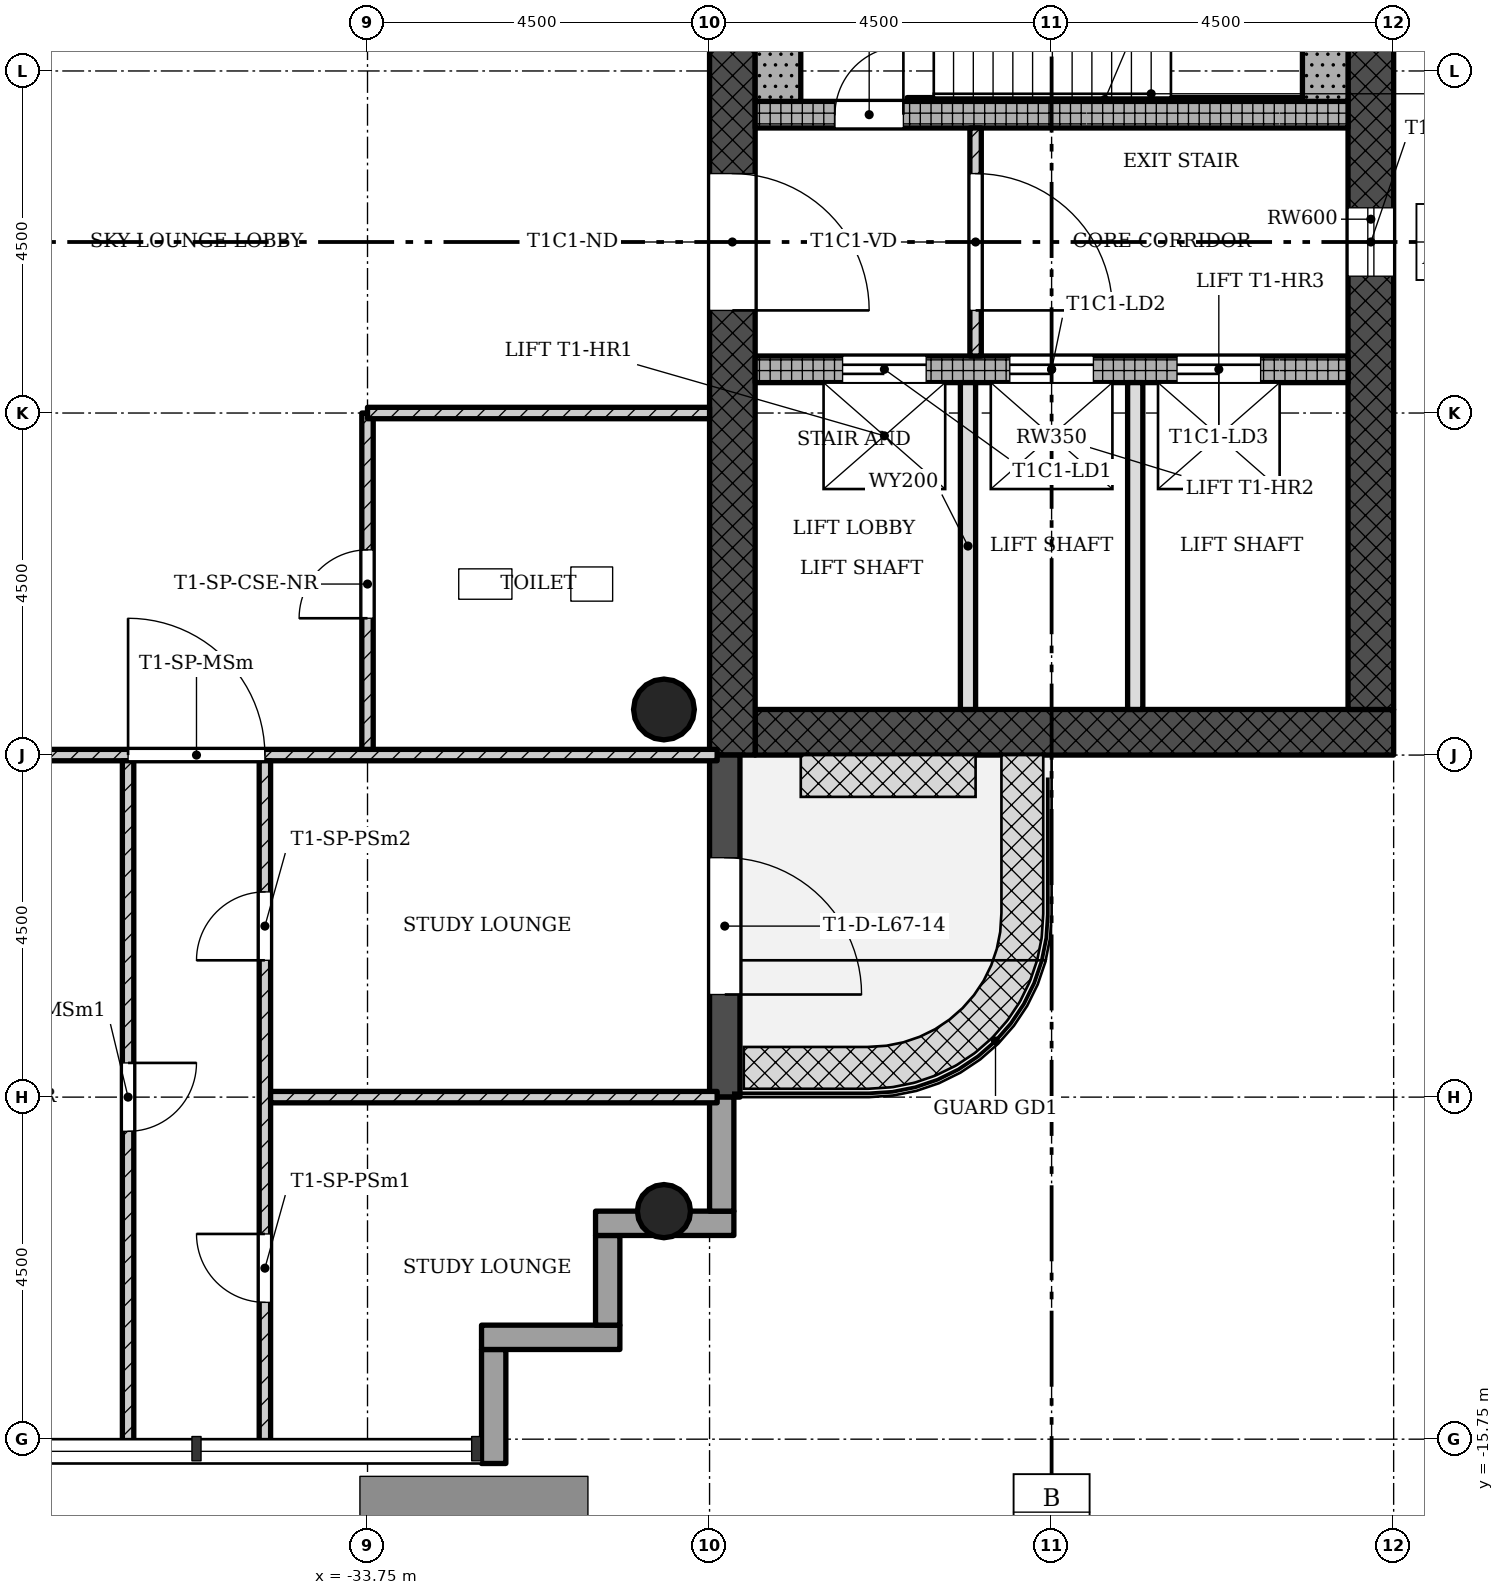
"""IFC4 building model, lengths in metres.
Left out: names, types, materials, properties, quantities, classifications, styles, units other than length and angle.
Written with IfcOpenShell. Run it as: python <this file> out.ifc"""

import sys

from ifc_helpers import new_model, si_unit, direction, frame, frame_2d, origin, origin_2d, place, context, subcontext, project, spatial, rectangle, hollow_circle, extrude, element, fill, save


model = new_model("IFC4")
c1 = context("Model", 3, precision=1e-05, world=origin(), true_north=direction((0.0, 1.0)))
c2 = subcontext(c1, "Body", "Model", "MODEL_VIEW")
j1 = project(units=[si_unit("LENGTHUNIT", "METRE"), si_unit("PLANEANGLEUNIT", "RADIAN")], contexts=[c1])
p1 = place(None, origin())
s1 = spatial("IfcSite", under=j1, at=p1, CompositionType="ELEMENT")
p2 = place(p1, origin())
s2 = spatial("IfcBuilding", under=s1, at=p2, CompositionType="ELEMENT")
p3 = place(p2, frame((0.0, 0.0, 242.4)))
s3 = spatial("IfcBuildingStorey", under=s2, at=p3, CompositionType="ELEMENT", Elevation=242.4)
p4 = place(p3, frame((-28.65, -6.45, 0.0), z_axis=(0.0, 0.0, 1.0), x_axis=(1.0, 0.0, 0.0)))
e1 = element("IfcWall", 1, at=p4, inside=s3, PredefinedType="SHEAR", context=c2, shape_type="SweptSolid", body=[
    extrude(rectangle(XDim=8.4, YDim=0.6, at=frame_2d((4.2, 0.0))), origin(), (0.0, 0.0, 1.0), 4.5),
])
p5 = place(p3, frame((-20.55, -6.15, 0.0), z_axis=(0.0, 0.0, 1.0), x_axis=(0.0, 1.0, 0.0)))
e2 = element("IfcWall", 2, at=p5, inside=s3, PredefinedType="SHEAR", context=c2, shape_type="SweptSolid", body=[
    extrude(rectangle(XDim=12.9, YDim=0.6, at=frame_2d((6.45, 0.0))), origin(), (0.0, 0.0, 1.0), 4.5),
])
p6 = place(p5, frame((5.7, 0.0, 0.45)))
e3 = element("IfcOpeningElement", 3, at=p6, cuts=e2, PredefinedType="OPENING", context=c2, shape_type="SweptSolid", body=[
    extrude(rectangle(XDim=0.9, YDim=2.4, at=frame_2d((0.45, 1.2))), frame((0.0, 0.31, 0.0), z_axis=(0.0, -1.0, 0.0), x_axis=(1.0, 0.0, 0.0)), (0.0, 0.0, 1.0), 0.62),
])
p7 = place(p3, frame((-28.95, 6.15, 0.0), z_axis=(0.0, 0.0, 1.0), x_axis=(0.0, -1.0, 0.0)))
e4 = element("IfcWall", 4, at=p7, inside=s3, PredefinedType="SHEAR", context=c2, shape_type="SweptSolid", body=[
    extrude(rectangle(XDim=12.9, YDim=0.6, at=frame_2d((6.45, 0.0))), origin(), (0.0, 0.0, 1.0), 4.5),
])
p8 = place(p7, frame((5.25, 0.0, 0.0)))
e5 = element("IfcOpeningElement", 5, at=p8, cuts=e4, PredefinedType="OPENING", context=c2, shape_type="SweptSolid", body=[
    extrude(rectangle(XDim=1.8, YDim=2.1, at=frame_2d((0.9, 1.05))), frame((0.0, 0.31, 0.0), z_axis=(0.0, -1.0, 0.0), x_axis=(1.0, 0.0, 0.0)), (0.0, 0.0, 1.0), 0.62),
])
p9 = place(p3, frame((-28.65, -1.675, 0.0), z_axis=(0.0, 0.0, 1.0), x_axis=(1.0, 0.0, 0.0)))
e6 = element("IfcWall", 6, at=p9, inside=s3, PredefinedType="SHEAR", context=c2, shape_type="SweptSolid", body=[
    extrude(rectangle(XDim=7.8, YDim=0.35, at=frame_2d((3.9, 0.0))), origin(), (0.0, 0.0, 1.0), 4.5),
])
p10 = place(p9, frame((1.15, 0.0, 0.0)))
e7 = element("IfcOpeningElement", 7, at=p10, cuts=e6, PredefinedType="OPENING", context=c2, shape_type="SweptSolid", body=[
    extrude(rectangle(XDim=1.1, YDim=2.1, at=frame_2d((0.55, 1.05))), frame((0.0, 0.185, 0.0), z_axis=(0.0, -1.0, 0.0), x_axis=(1.0, 0.0, 0.0)), (0.0, 0.0, 1.0), 0.37),
])
p11 = place(p9, frame((3.35, 0.0, 0.0)))
e8 = element("IfcOpeningElement", 8, at=p11, cuts=e6, PredefinedType="OPENING", context=c2, shape_type="SweptSolid", body=[
    extrude(rectangle(XDim=1.1, YDim=2.1, at=frame_2d((0.55, 1.05))), frame((0.0, 0.185, 0.0), z_axis=(0.0, -1.0, 0.0), x_axis=(1.0, 0.0, 0.0)), (0.0, 0.0, 1.0), 0.37),
])
p12 = place(p9, frame((5.55, 0.0, 0.0)))
e9 = element("IfcOpeningElement", 9, at=p12, cuts=e6, PredefinedType="OPENING", context=c2, shape_type="SweptSolid", body=[
    extrude(rectangle(XDim=1.1, YDim=2.1, at=frame_2d((0.55, 1.05))), frame((0.0, 0.185, 0.0), z_axis=(0.0, -1.0, 0.0), x_axis=(1.0, 0.0, 0.0)), (0.0, 0.0, 1.0), 0.37),
])
p13 = place(p3, frame((-28.65, 1.675, 0.0), z_axis=(0.0, 0.0, 1.0), x_axis=(1.0, 0.0, 0.0)))
e10 = element("IfcWall", 10, at=p13, inside=s3, PredefinedType="SHEAR", context=c2, shape_type="SweptSolid", body=[
    extrude(rectangle(XDim=7.8, YDim=0.35, at=frame_2d((3.9, 0.0))), origin(), (0.0, 0.0, 1.0), 4.5),
])
p14 = place(p13, frame((1.05, 0.0, 0.0)))
e11 = element("IfcOpeningElement", 11, at=p14, cuts=e10, PredefinedType="OPENING", context=c2, shape_type="SweptSolid", body=[
    extrude(rectangle(XDim=0.9, YDim=2.1, at=frame_2d((0.45, 1.05))), frame((0.0, 0.185, 0.0), z_axis=(0.0, -1.0, 0.0), x_axis=(1.0, 0.0, 0.0)), (0.0, 0.0, 1.0), 0.37),
])
p15 = place(p3, frame((-29.85, -12.75, 0.0), z_axis=(0.0, 0.0, 1.0), x_axis=(1.0, 0.0, 0.0)))
e12 = element("IfcColumn", 12, at=p15, inside=s3, PredefinedType="COLUMN", context=c2, shape_type="SweptSolid", body=[
    extrude(hollow_circle(Radius=0.35, WallThickness=0.025, at=origin_2d()), origin(), (0.0, 0.0, 1.0), 4.5),
])
p16 = place(p3, frame((-29.85, -6.15, 0.0), z_axis=(0.0, 0.0, 1.0), x_axis=(1.0, 0.0, 0.0)))
e13 = element("IfcColumn", 13, at=p16, inside=s3, PredefinedType="COLUMN", context=c2, shape_type="SweptSolid", body=[
    extrude(hollow_circle(Radius=0.4, WallThickness=0.028, at=origin_2d()), origin(), (0.0, 0.0, 1.0), 4.5),
])
p17 = place(p3, frame((-32.09, -16.07, -0.3), z_axis=(0.0, 0.0, 1.0), x_axis=(0.0, 1.0, 0.0)))
e14 = element("IfcWall", 14, at=p17, inside=s3, PredefinedType="STANDARD", context=c2, shape_type="SweptSolid", body=[
    extrude(rectangle(XDim=1.5, YDim=0.32, at=frame_2d((0.75, 0.0))), origin(), (0.0, 0.0, 1.0), 4.5),
])
p18 = place(p3, frame((-32.25, -14.41, -0.3), z_axis=(0.0, 0.0, 1.0), x_axis=(1.0, 0.0, 0.0)))
e15 = element("IfcWall", 15, at=p18, inside=s3, PredefinedType="STANDARD", context=c2, shape_type="SweptSolid", body=[
    extrude(rectangle(XDim=1.82, YDim=0.32, at=frame_2d((0.91, 0.0))), origin(), (0.0, 0.0, 1.0), 4.5),
])
p19 = place(p3, frame((-30.59, -14.25, -0.3), z_axis=(0.0, 0.0, 1.0), x_axis=(0.0, 1.0, 0.0)))
e16 = element("IfcWall", 16, at=p19, inside=s3, PredefinedType="STANDARD", context=c2, shape_type="SweptSolid", body=[
    extrude(rectangle(XDim=1.18, YDim=0.32, at=frame_2d((0.59, 0.0))), origin(), (0.0, 0.0, 1.0), 4.5),
])
p20 = place(p3, frame((-30.75, -12.91, -0.3), z_axis=(0.0, 0.0, 1.0), x_axis=(1.0, 0.0, 0.0)))
e17 = element("IfcWall", 17, at=p20, inside=s3, PredefinedType="STANDARD", context=c2, shape_type="SweptSolid", body=[
    extrude(rectangle(XDim=1.82, YDim=0.32, at=frame_2d((0.91, 0.0))), origin(), (0.0, 0.0, 1.0), 4.5),
])
p21 = place(p3, frame((-29.09, -12.75, -0.3), z_axis=(0.0, 0.0, 1.0), x_axis=(0.0, 1.0, 0.0)))
e18 = element("IfcWall", 18, at=p21, inside=s3, PredefinedType="STANDARD", context=c2, shape_type="SweptSolid", body=[
    extrude(rectangle(XDim=1.5, YDim=0.32, at=frame_2d((0.75, 0.0))), origin(), (0.0, 0.0, 1.0), 4.5),
])
p22 = place(p3, frame((-29.05, -11.25, -0.02), z_axis=(0.0, 0.0, 1.0), x_axis=(0.0, 1.0, 0.0)))
e19 = element("IfcWall", 19, at=p22, inside=s3, PredefinedType="STANDARD", context=c2, shape_type="SweptSolid", body=[
    extrude(rectangle(XDim=4.5, YDim=0.4, at=frame_2d((2.25, 0.0))), origin(), (0.0, 0.0, 1.0), 4.22),
])
p23 = place(p22, frame((1.35, 0.0, 0.02)))
e20 = element("IfcOpeningElement", 20, at=p23, cuts=e19, PredefinedType="OPENING", context=c2, shape_type="SweptSolid", body=[
    extrude(rectangle(XDim=1.8, YDim=2.1, at=frame_2d((0.9, 1.05))), frame((0.0, 0.21, 0.0), z_axis=(0.0, -1.0, 0.0), x_axis=(1.0, 0.0, 0.0)), (0.0, 0.0, 1.0), 0.42),
])
p24 = place(p3, frame((-25.75, -1.5, 0.0), z_axis=(0.0, 0.0, 1.0), x_axis=(0.0, 1.0, 0.0)))
e21 = element("IfcWall", 21, at=p24, inside=s3, PredefinedType="PARTITIONING", context=c2, shape_type="SweptSolid", body=[
    extrude(rectangle(XDim=3.0, YDim=0.15, at=frame_2d((1.5, 0.0))), origin(), (0.0, 0.0, 1.0), 4.08),
])
p25 = place(p24, frame((0.6, 0.0, 0.0)))
e22 = element("IfcOpeningElement", 22, at=p25, cuts=e21, PredefinedType="OPENING", context=c2, shape_type="SweptSolid", body=[
    extrude(rectangle(XDim=1.8, YDim=2.1, at=frame_2d((0.9, 1.05))), frame((0.0, 0.085, 0.0), z_axis=(0.0, -1.0, 0.0), x_axis=(1.0, 0.0, 0.0)), (0.0, 0.0, 1.0), 0.17),
])
for number, where, z_axis, x_axis in (
    (23, (-25.85, -6.15, 0.0), (0.0, 0.0, 1.0), (0.0, 1.0, 0.0)),
    (24, (-23.65, -6.15, 0.0), (0.0, 0.0, 1.0), (0.0, 1.0, 0.0)),
):
    element("IfcWall", number, at=place(p3, frame(where, z_axis=z_axis, x_axis=x_axis)), inside=s3, PredefinedType="SOLIDWALL", context=c2, shape_type="SweptSolid", body=[
        extrude(rectangle(XDim=4.3, YDim=0.2, at=frame_2d((2.15, 0.0))), origin(), (0.0, 0.0, 1.0), 4.08),
    ])
p26 = place(p3, frame((-33.75, -6.75, 0.0), z_axis=(0.0, 0.0, 1.0), x_axis=(0.0, 1.0, 0.0)))
e25 = element("IfcWall", 25, at=p26, inside=s3, PredefinedType="PARTITIONING", context=c2, shape_type="SweptSolid", body=[
    extrude(rectangle(XDim=4.5, YDim=0.15, at=frame_2d((2.25, 0.0))), origin(), (0.0, 0.0, 1.0), 4.08),
])
p27 = place(p26, frame((1.8, 0.0, 0.0)))
e26 = element("IfcOpeningElement", 26, at=p27, cuts=e25, PredefinedType="OPENING", context=c2, shape_type="SweptSolid", body=[
    extrude(rectangle(XDim=0.9, YDim=2.1, at=frame_2d((0.45, 1.05))), frame((0.0, 0.085, 0.0), z_axis=(0.0, -1.0, 0.0), x_axis=(1.0, 0.0, 0.0)), (0.0, 0.0, 1.0), 0.17),
])
p28 = place(p3, frame((-33.75, -2.25, 0.0), z_axis=(0.0, 0.0, 1.0), x_axis=(1.0, 0.0, 0.0)))
e27 = element("IfcWall", 27, at=p28, inside=s3, PredefinedType="PARTITIONING", context=c2, shape_type="SweptSolid", body=[
    extrude(rectangle(XDim=4.5, YDim=0.15, at=frame_2d((2.25, 0.0))), origin(), (0.0, 0.0, 1.0), 4.08),
])
p29 = place(p3, frame((-42.85, -6.75, 0.0), z_axis=(0.0, 0.0, 1.0), x_axis=(1.0, 0.0, 0.0)))
e28 = element("IfcWall", 28, at=p29, inside=s3, PredefinedType="PARTITIONING", context=c2, shape_type="SweptSolid", body=[
    extrude(rectangle(XDim=13.7, YDim=0.15, at=frame_2d((6.85, 0.0))), origin(), (0.0, 0.0, 1.0), 4.08),
])
p30 = place(p29, frame((5.95, 0.0, 0.0)))
e29 = element("IfcOpeningElement", 29, at=p30, cuts=e28, PredefinedType="OPENING", context=c2, shape_type="SweptSolid", body=[
    extrude(rectangle(XDim=1.8, YDim=2.1, at=frame_2d((0.9, 1.05))), frame((0.0, 0.085, 0.0), z_axis=(0.0, -1.0, 0.0), x_axis=(1.0, 0.0, 0.0)), (0.0, 0.0, 1.0), 0.17),
])
p31 = place(p3, frame((-35.1, -15.85, 0.0), z_axis=(0.0, 0.0, 1.0), x_axis=(0.0, 1.0, 0.0)))
e30 = element("IfcWall", 30, at=p31, inside=s3, PredefinedType="PARTITIONING", context=c2, shape_type="SweptSolid", body=[
    extrude(rectangle(XDim=9.025, YDim=0.15, at=frame_2d((4.513, 0.0))), origin(), (0.0, 0.0, 1.0), 4.08),
])
p32 = place(p31, frame((1.9, 0.0, 0.0)))
e31 = element("IfcOpeningElement", 31, at=p32, cuts=e30, PredefinedType="OPENING", context=c2, shape_type="SweptSolid", body=[
    extrude(rectangle(XDim=0.9, YDim=2.1, at=frame_2d((0.45, 1.05))), frame((0.0, 0.085, 0.0), z_axis=(0.0, -1.0, 0.0), x_axis=(1.0, 0.0, 0.0)), (0.0, 0.0, 1.0), 0.17),
])
p33 = place(p31, frame((6.4, 0.0, 0.0)))
e32 = element("IfcOpeningElement", 32, at=p33, cuts=e30, PredefinedType="OPENING", context=c2, shape_type="SweptSolid", body=[
    extrude(rectangle(XDim=0.9, YDim=2.1, at=frame_2d((0.45, 1.05))), frame((0.0, 0.085, 0.0), z_axis=(0.0, -1.0, 0.0), x_axis=(1.0, 0.0, 0.0)), (0.0, 0.0, 1.0), 0.17),
])
p34 = place(p3, frame((-35.025, -11.25, 0.0), z_axis=(0.0, 0.0, 1.0), x_axis=(1.0, 0.0, 0.0)))
e33 = element("IfcWall", 33, at=p34, inside=s3, PredefinedType="PARTITIONING", context=c2, shape_type="SweptSolid", body=[
    extrude(rectangle(XDim=5.875, YDim=0.15, at=frame_2d((2.938, 0.0))), origin(), (0.0, 0.0, 1.0), 4.08),
])
p35 = place(p3, frame((-36.9, -15.85, 0.0), z_axis=(0.0, 0.0, 1.0), x_axis=(0.0, 1.0, 0.0)))
e34 = element("IfcWall", 34, at=p35, inside=s3, PredefinedType="PARTITIONING", context=c2, shape_type="SweptSolid", body=[
    extrude(rectangle(XDim=9.025, YDim=0.15, at=frame_2d((4.513, 0.0))), origin(), (0.0, 0.0, 1.0), 4.08),
])
p36 = place(p35, frame((4.15, 0.0, 0.0)))
e35 = element("IfcOpeningElement", 35, at=p36, cuts=e34, PredefinedType="OPENING", context=c2, shape_type="SweptSolid", body=[
    extrude(rectangle(XDim=0.9, YDim=2.1, at=frame_2d((0.45, 1.05))), frame((0.0, 0.085, 0.0), z_axis=(0.0, -1.0, 0.0), x_axis=(1.0, 0.0, 0.0)), (0.0, 0.0, 1.0), 0.17),
])
for number, where, z_axis, x_axis in (
    (36, (-21.15, 1.85, 0.0), (0.0, 0.0, 1.0), (0.0, 1.0, 0.0)),
    (37, (-28.35, 1.85, 0.0), (0.0, 0.0, 1.0), (0.0, 1.0, 0.0)),
):
    element("IfcWall", number, at=place(p3, frame(where, z_axis=z_axis, x_axis=x_axis)), inside=s3, PredefinedType="SHEAR", context=c2, shape_type="SweptSolid", body=[
        extrude(rectangle(XDim=4.3, YDim=0.6, at=frame_2d((2.15, 0.0))), origin(), (0.0, 0.0, 1.0), 4.5),
    ])
p37 = place(p3, frame((-26.65, 1.875, 0.0), z_axis=(0.0, 0.0, 1.0), x_axis=(1.0, 0.0, 0.0)))
e38 = element("IfcWall", 38, at=p37, inside=s3, PredefinedType="SHEAR", context=c2, shape_type="SweptSolid", body=[
    extrude(rectangle(XDim=5.2, YDim=0.05, at=frame_2d((2.6, 0.0))), origin(), (0.0, 0.0, 1.0), 4.5),
])
p38 = place(p23, origin())
e39 = element("IfcDoor", 39, at=p38, inside=s3, OperationType="SINGLE_SWING_LEFT", PredefinedType="DOOR", context=c2, shape_type="SweptSolid", body=[
    extrude(rectangle(XDim=1.8, YDim=2.1, at=frame_2d((0.9, 1.05))), frame((0.0, 0.025, 0.0), z_axis=(0.0, -1.0, 0.0), x_axis=(1.0, 0.0, 0.0)), (0.0, 0.0, 1.0), 0.05),
])
fill(e20, e39)
p39 = place(p6, origin())
e40 = element("IfcWindow", 40, at=p39, inside=s3, PartitioningType="SINGLE_PANEL", PredefinedType="WINDOW", context=c2, shape_type="SweptSolid", body=[
    extrude(rectangle(XDim=0.9, YDim=2.4, at=frame_2d((0.45, 1.2))), frame((0.0, 0.03, 0.0), z_axis=(0.0, -1.0, 0.0), x_axis=(1.0, 0.0, 0.0)), (0.0, 0.0, 1.0), 0.06),
])
fill(e3, e40)
p40 = place(p25, origin())
e41 = element("IfcDoor", 41, at=p40, inside=s3, OperationType="SINGLE_SWING_LEFT", PredefinedType="DOOR", context=c2, shape_type="SweptSolid", body=[
    extrude(rectangle(XDim=1.8, YDim=2.1, at=frame_2d((0.9, 1.05))), frame((0.0, 0.025, 0.0), z_axis=(0.0, -1.0, 0.0), x_axis=(1.0, 0.0, 0.0)), (0.0, 0.0, 1.0), 0.05),
])
fill(e22, e41)
p41 = place(p27, origin())
e42 = element("IfcDoor", 42, at=p41, inside=s3, OperationType="SINGLE_SWING_RIGHT", PredefinedType="DOOR", context=c2, shape_type="SweptSolid", body=[
    extrude(rectangle(XDim=0.9, YDim=2.1, at=frame_2d((0.45, 1.05))), frame((0.0, 0.025, 0.0), z_axis=(0.0, -1.0, 0.0), x_axis=(1.0, 0.0, 0.0)), (0.0, 0.0, 1.0), 0.05),
])
fill(e26, e42)
p42 = place(p30, origin())
e43 = element("IfcDoor", 43, at=p42, inside=s3, OperationType="SINGLE_SWING_RIGHT", PredefinedType="DOOR", context=c2, shape_type="SweptSolid", body=[
    extrude(rectangle(XDim=1.8, YDim=2.1, at=frame_2d((0.9, 1.05))), frame((0.0, 0.025, 0.0), z_axis=(0.0, -1.0, 0.0), x_axis=(1.0, 0.0, 0.0)), (0.0, 0.0, 1.0), 0.05),
])
fill(e29, e43)
p43 = place(p32, origin())
e44 = element("IfcDoor", 44, at=p43, inside=s3, OperationType="SINGLE_SWING_LEFT", PredefinedType="DOOR", context=c2, shape_type="SweptSolid", body=[
    extrude(rectangle(XDim=0.9, YDim=2.1, at=frame_2d((0.45, 1.05))), frame((0.0, 0.025, 0.0), z_axis=(0.0, -1.0, 0.0), x_axis=(1.0, 0.0, 0.0)), (0.0, 0.0, 1.0), 0.05),
])
fill(e31, e44)
p44 = place(p33, origin())
e45 = element("IfcDoor", 45, at=p44, inside=s3, OperationType="SINGLE_SWING_RIGHT", PredefinedType="DOOR", context=c2, shape_type="SweptSolid", body=[
    extrude(rectangle(XDim=0.9, YDim=2.1, at=frame_2d((0.45, 1.05))), frame((0.0, 0.025, 0.0), z_axis=(0.0, -1.0, 0.0), x_axis=(1.0, 0.0, 0.0)), (0.0, 0.0, 1.0), 0.05),
])
fill(e32, e45)
p45 = place(p36, origin())
e46 = element("IfcDoor", 46, at=p45, inside=s3, OperationType="SINGLE_SWING_RIGHT", PredefinedType="DOOR", context=c2, shape_type="SweptSolid", body=[
    extrude(rectangle(XDim=0.9, YDim=2.1, at=frame_2d((0.45, 1.05))), frame((0.0, 0.025, 0.0), z_axis=(0.0, -1.0, 0.0), x_axis=(1.0, 0.0, 0.0)), (0.0, 0.0, 1.0), 0.05),
])
fill(e35, e46)
p46 = place(p14, origin())
e47 = element("IfcDoor", 47, at=p46, inside=s3, OperationType="SINGLE_SWING_LEFT", PredefinedType="DOOR", context=c2, shape_type="SweptSolid", body=[
    extrude(rectangle(XDim=0.9, YDim=2.1, at=frame_2d((0.45, 1.05))), frame((0.0, 0.025, 0.0), z_axis=(0.0, -1.0, 0.0), x_axis=(1.0, 0.0, 0.0)), (0.0, 0.0, 1.0), 0.05),
])
fill(e11, e47)
p47 = place(p10, origin())
e48 = element("IfcDoor", 48, at=p47, inside=s3, OperationType="SLIDING_TO_LEFT", PredefinedType="DOOR", context=c2, shape_type="SweptSolid", body=[
    extrude(rectangle(XDim=1.1, YDim=2.1, at=frame_2d((0.55, 1.05))), frame((0.0, 0.025, 0.0), z_axis=(0.0, -1.0, 0.0), x_axis=(1.0, 0.0, 0.0)), (0.0, 0.0, 1.0), 0.05),
])
fill(e7, e48)
p48 = place(p11, origin())
e49 = element("IfcDoor", 49, at=p48, inside=s3, OperationType="SLIDING_TO_LEFT", PredefinedType="DOOR", context=c2, shape_type="SweptSolid", body=[
    extrude(rectangle(XDim=1.1, YDim=2.1, at=frame_2d((0.55, 1.05))), frame((0.0, 0.025, 0.0), z_axis=(0.0, -1.0, 0.0), x_axis=(1.0, 0.0, 0.0)), (0.0, 0.0, 1.0), 0.05),
])
fill(e8, e49)
p49 = place(p12, origin())
e50 = element("IfcDoor", 50, at=p49, inside=s3, OperationType="SLIDING_TO_LEFT", PredefinedType="DOOR", context=c2, shape_type="SweptSolid", body=[
    extrude(rectangle(XDim=1.1, YDim=2.1, at=frame_2d((0.55, 1.05))), frame((0.0, 0.025, 0.0), z_axis=(0.0, -1.0, 0.0), x_axis=(1.0, 0.0, 0.0)), (0.0, 0.0, 1.0), 0.05),
])
fill(e9, e50)
p50 = place(p8, origin())
e51 = element("IfcDoor", 51, at=p50, inside=s3, OperationType="SINGLE_SWING_LEFT", PredefinedType="DOOR", context=c2, shape_type="SweptSolid", body=[
    extrude(rectangle(XDim=1.8, YDim=2.1, at=frame_2d((0.9, 1.05))), frame((0.0, 0.025, 0.0), z_axis=(0.0, -1.0, 0.0), x_axis=(1.0, 0.0, 0.0)), (0.0, 0.0, 1.0), 0.05),
])
fill(e5, e51)
save(model, sys.argv[1])
